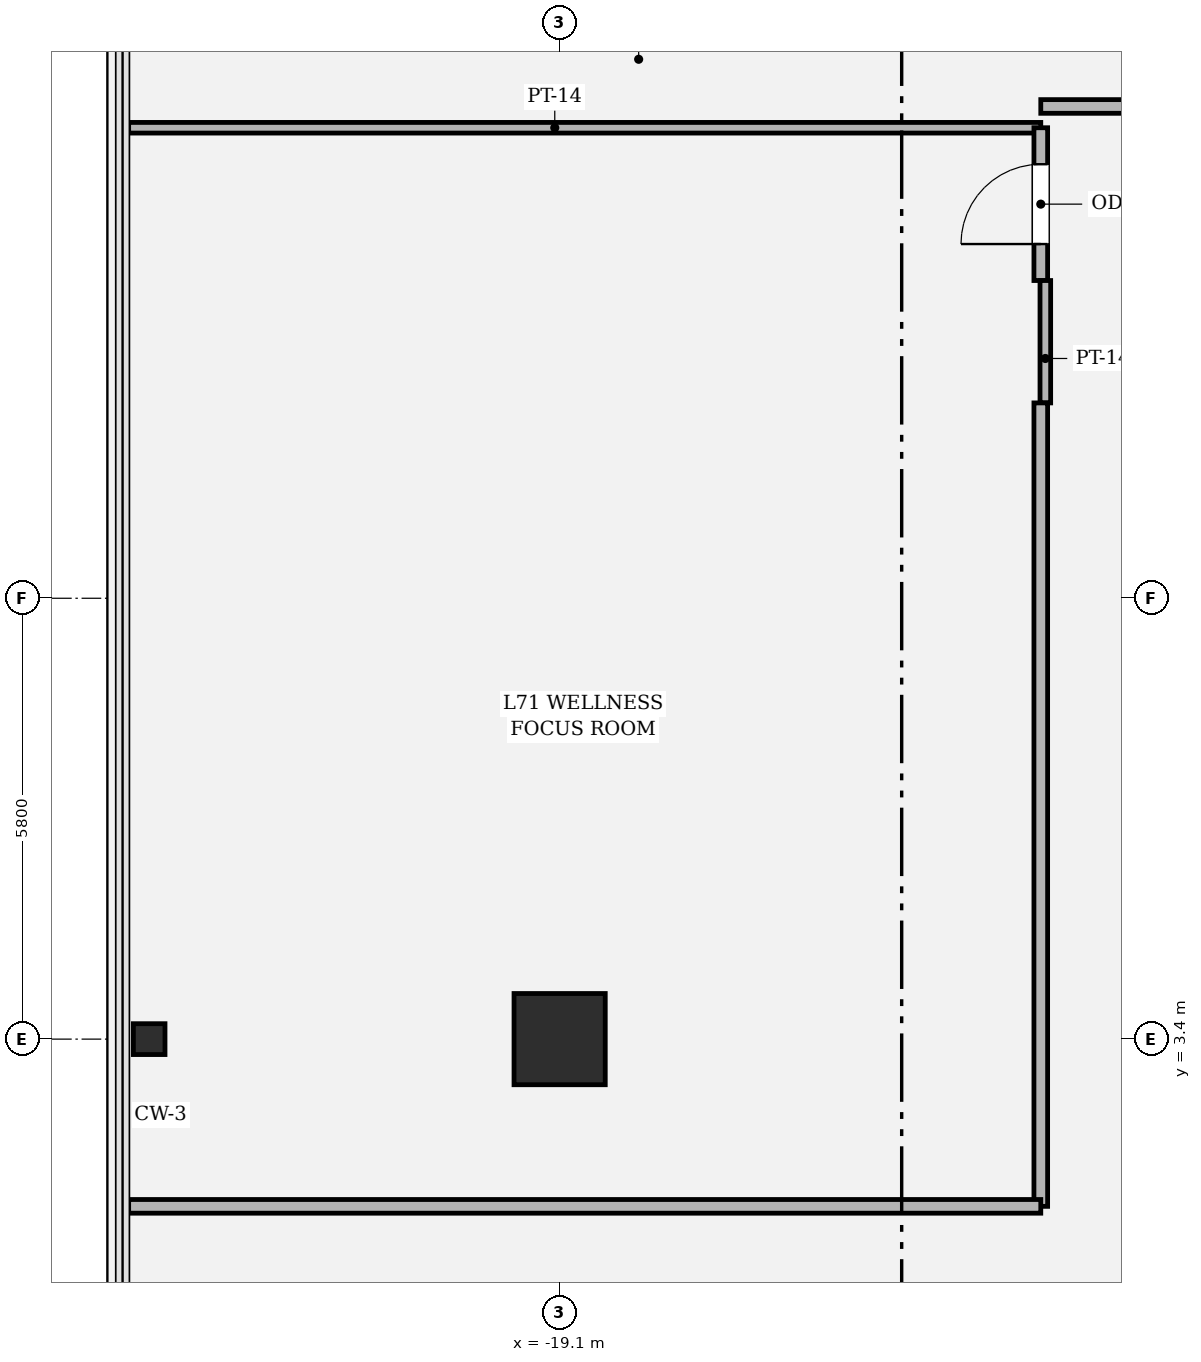
"""IFC4 building model, lengths in metres.
Left out: names, types, materials, properties, quantities, classifications, styles, units other than length and angle.
Written with IfcOpenShell. Run it as: python <this file> out.ifc"""

import sys

from ifc_helpers import new_model, si_unit, direction, frame, frame_2d, origin, origin_2d, place, context, subcontext, project, spatial, rectangle, hollow_rectangle, i_section, extrude, element, fill, save


model = new_model("IFC4")
c1 = context("Model", 3, precision=1e-05, world=origin(), true_north=direction((0.0, 1.0)))
c2 = subcontext(c1, "Body", "Model", "MODEL_VIEW")
j1 = project(units=[si_unit("LENGTHUNIT", "METRE"), si_unit("PLANEANGLEUNIT", "RADIAN")], contexts=[c1])
p1 = place(None, origin())
s1 = spatial("IfcSite", under=j1, at=p1, CompositionType="ELEMENT")
p2 = place(p1, origin())
s2 = spatial("IfcBuilding", under=s1, at=p2, CompositionType="ELEMENT")
p3 = place(p2, frame((0.0, 0.0, 300.6)))
s3 = spatial("IfcBuildingStorey", under=s2, at=p3, CompositionType="ELEMENT", Elevation=300.6)
p4 = place(p3, frame((-19.1, 3.4, 0.0), z_axis=(0.0, 0.0, 1.0), x_axis=(1.0, 0.0, 0.0)))
e1 = element("IfcColumn", 1, at=p4, inside=s3, PredefinedType="COLUMN", context=c2, shape_type="SweptSolid", body=[
    extrude(hollow_rectangle(XDim=1.2, YDim=1.2, WallThickness=0.035, at=origin_2d()), origin(), (0.0, 0.0, 1.0), 4.2),
])
p5 = place(p3, frame((-24.5, 3.4, 0.0), z_axis=(0.0, 0.0, 1.0), x_axis=(0.0, 1.0, 0.0)))
e2 = element("IfcColumn", 2, at=p5, inside=s3, PredefinedType="COLUMN", context=c2, shape_type="SweptSolid", body=[
    extrude(i_section(OverallWidth=0.406, OverallDepth=0.416, WebThickness=0.029, FlangeThickness=0.048, FilletRadius=0.018, at=origin_2d()), origin(), (0.0, 0.0, 1.0), 4.198),
])
p6 = place(p3, frame((-24.77, 15.39, 0.0), z_axis=(0.0, 0.0, 1.0), x_axis=(1.0, 0.0, 0.0)))
e3 = element("IfcWall", 3, at=p6, inside=s3, PredefinedType="PARTITIONING", context=c2, shape_type="SweptSolid", body=[
    extrude(rectangle(XDim=12.0, YDim=0.14, at=frame_2d((6.0, 0.0))), origin(), (0.0, 0.0, 1.0), 2.714),
])
p7 = place(p3, frame((-12.77, 15.39, 0.0), z_axis=(0.0, 0.0, 1.0), x_axis=(0.0, -1.0, 0.0)))
e4 = element("IfcWall", 4, at=p7, inside=s3, PredefinedType="PARTITIONING", context=c2, shape_type="SweptSolid", body=[
    extrude(rectangle(XDim=2.01, YDim=0.18, at=frame_2d((1.005, 0.0))), origin(), (0.0, 0.0, 1.0), 3.634),
])
p8 = place(p7, frame((0.48, 0.0, 0.0)))
e5 = element("IfcOpeningElement", 5, at=p8, cuts=e4, PredefinedType="OPENING", context=c2, shape_type="SweptSolid", body=[
    extrude(rectangle(XDim=1.05, YDim=2.2, at=frame_2d((0.525, 1.1))), frame((0.0, 0.1, 0.0), z_axis=(0.0, -1.0, 0.0), x_axis=(1.0, 0.0, 0.0)), (0.0, 0.0, 1.0), 0.2),
])
p9 = place(p3, frame((-12.71, 13.38, 0.0), z_axis=(0.0, 0.0, 1.0), x_axis=(0.0, -1.0, 0.0)))
e6 = element("IfcWall", 6, at=p9, inside=s3, PredefinedType="PARTITIONING", context=c2, shape_type="SweptSolid", body=[
    extrude(rectangle(XDim=1.61, YDim=0.14, at=frame_2d((0.805, 0.0))), origin(), (0.0, 0.0, 1.0), 3.634),
])
p10 = place(p3, frame((-12.77, 11.77, 0.0), z_axis=(0.0, 0.0, 1.0), x_axis=(0.0, -1.0, 0.0)))
e7 = element("IfcWall", 7, at=p10, inside=s3, PredefinedType="PARTITIONING", context=c2, shape_type="SweptSolid", body=[
    extrude(rectangle(XDim=10.57, YDim=0.18, at=frame_2d((5.285, 0.0))), origin(), (0.0, 0.0, 1.0), 3.394),
])
p11 = place(p3, frame((-12.77, 1.2, 0.0), z_axis=(0.0, 0.0, 1.0), x_axis=(-1.0, 0.0, 0.0)))
e8 = element("IfcWall", 8, at=p11, inside=s3, PredefinedType="PARTITIONING", context=c2, shape_type="SweptSolid", body=[
    extrude(rectangle(XDim=12.0, YDim=0.18, at=frame_2d((6.0, 0.0))), origin(), (0.0, 0.0, 1.0), 2.714),
])
p12 = place(p3, frame((0.318, 15.67, 0.0), z_axis=(0.0, 0.0, 1.0), x_axis=(-1.0, 0.0, 0.0)))
e9 = element("IfcWall", 9, at=p12, inside=s3, PredefinedType="PARTITIONING", context=c2, shape_type="SweptSolid", body=[
    extrude(rectangle(XDim=13.088, YDim=0.18, at=frame_2d((6.544, 0.0))), origin(), (0.0, 0.0, 1.0), 3.394),
])
p13 = place(p12, frame((5.844, 0.0, 0.0)))
e10 = element("IfcOpeningElement", 10, at=p13, cuts=e9, PredefinedType="OPENING", context=c2, shape_type="SweptSolid", body=[
    extrude(rectangle(XDim=1.4, YDim=2.25, at=frame_2d((0.7, 1.125))), frame((0.0, 0.1, 0.0), z_axis=(0.0, -1.0, 0.0), x_axis=(1.0, 0.0, 0.0)), (0.0, 0.0, 1.0), 0.2),
])
p14 = place(p8, origin())
e11 = element("IfcDoor", 11, at=p14, inside=s3, OperationType="SINGLE_SWING_RIGHT", PredefinedType="DOOR", context=c2, shape_type="SweptSolid", body=[
    extrude(rectangle(XDim=1.05, YDim=2.2, at=frame_2d((0.525, 1.1))), frame((0.0, 0.025, 0.0), z_axis=(0.0, -1.0, 0.0), x_axis=(1.0, 0.0, 0.0)), (0.0, 0.0, 1.0), 0.05),
])
fill(e5, e11)
save(model, sys.argv[1])
